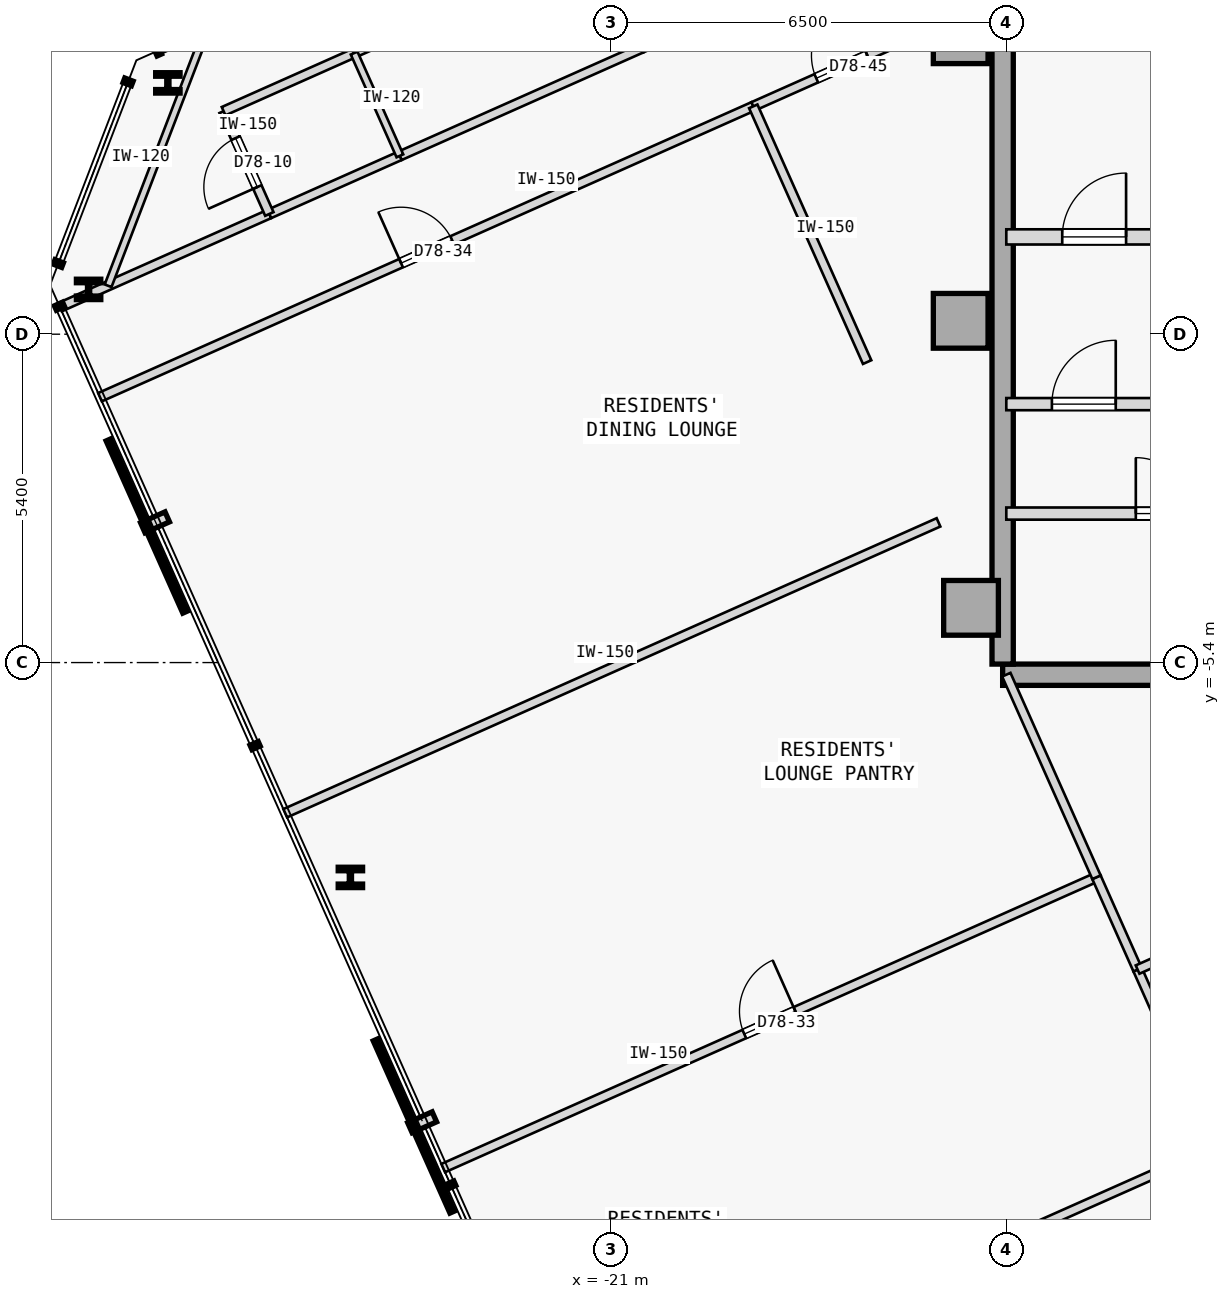
"""IFC4 building model, lengths in metres.
Left out: names, types, materials, properties, quantities, classifications, styles, units other than length and angle.
Written with IfcOpenShell. Run it as: python <this file> out.ifc"""

import sys

from ifc_helpers import new_model, si_unit, direction, frame, frame_2d, origin, origin_2d, place, context, subcontext, project, spatial, rectangle, i_section, extrude, element, fill, save


model = new_model("IFC4")
c1 = context("Model", 3, precision=1e-05, world=origin(), true_north=direction((0.0, 1.0)))
c2 = subcontext(c1, "Body", "Model", "MODEL_VIEW")
j1 = project(units=[si_unit("LENGTHUNIT", "METRE"), si_unit("PLANEANGLEUNIT", "RADIAN")], contexts=[c1])
p1 = place(None, origin())
s1 = spatial("IfcSite", under=j1, at=p1, CompositionType="ELEMENT")
p2 = place(p1, origin())
s2 = spatial("IfcBuilding", under=s1, at=p2, CompositionType="ELEMENT")
p3 = place(p2, frame((0.0, 0.0, 291.95)))
s3 = spatial("IfcBuildingStorey", under=s2, at=p3, CompositionType="ELEMENT", Elevation=291.95)
for number, where, z_axis, x_axis in (
    (1, (-15.25, 4.9, 0.0), (0.0, 0.0, 1.0), (1.0, 0.0, 0.0)),
    (2, (-15.25, 0.22, 0.0), (0.0, 0.0, 1.0), (1.0, 0.0, 0.0)),
    (3, (-15.08, -4.5, 0.0), (0.0, 0.0, 1.0), (1.0, 0.0, 0.0)),
):
    element("IfcColumn", number, at=place(p3, frame(where, z_axis=z_axis, x_axis=x_axis)), inside=s3, PredefinedType="COLUMN", context=c2, shape_type="SweptSolid", body=[
        extrude(rectangle(XDim=0.9, YDim=0.9, at=origin_2d()), origin(), (0.0, 0.0, 1.0), 3.35),
    ])
p4 = place(p3, frame((-14.56, -5.6, 0.0), z_axis=(0.0, 0.0, 1.0), x_axis=(1.0, 0.0, 0.0)))
e4 = element("IfcWall", 4, at=p4, inside=s3, PredefinedType="SHEAR", context=c2, shape_type="SweptSolid", body=[
    extrude(rectangle(XDim=10.86, YDim=0.35, at=frame_2d((5.43, 0.0))), origin(), (0.0, 0.0, 1.0), 3.125),
])
p5 = place(p3, frame((-14.56, -5.425, 0.0), z_axis=(0.0, 0.0, 1.0), x_axis=(0.0, 1.0, 0.0)))
e5 = element("IfcWall", 5, at=p5, inside=s3, PredefinedType="SHEAR", context=c2, shape_type="SweptSolid", body=[
    extrude(rectangle(XDim=10.85, YDim=0.35, at=frame_2d((5.425, 0.0))), origin(), (0.0, 0.0, 1.0), 3.125),
])
for number, where, z_axis, x_axis in (
    (6, (-28.288, 4.133, 0.0), (0.0, 0.0, 1.0), (1.0, 0.0, 0.0)),
    (7, (-29.592, 0.737, 0.0), (0.0, 0.0, 1.0), (1.0, 0.0, 0.0)),
    (8, (-25.286, -8.933, 0.0), (0.0, 0.0, 1.0), (1.0, 0.0, 0.0)),
):
    element("IfcColumn", number, at=place(p3, frame(where, z_axis=z_axis, x_axis=x_axis)), inside=s3, PredefinedType="COLUMN", context=c2, shape_type="SweptSolid", body=[
        extrude(i_section(OverallWidth=0.401, OverallDepth=0.335, WebThickness=0.036, FlangeThickness=0.058, FilletRadius=0.015, at=origin_2d()), origin(), (0.0, 0.0, 1.0), 3.35),
    ])
p6 = place(p3, frame((-14.5, 1.6, 0.0), z_axis=(0.0, 0.0, 1.0), x_axis=(1.0, 0.0, 0.0)))
e9 = element("IfcWall", 9, at=p6, inside=s3, PredefinedType="STANDARD", context=c2, shape_type="SweptSolid", body=[
    extrude(rectangle(XDim=3.6, YDim=0.25, at=frame_2d((1.8, 0.0))), origin(), (0.0, 0.0, 1.0), 3.125),
])
p7 = place(p6, frame((0.92, 0.0, 0.0)))
e10 = element("IfcOpeningElement", 10, at=p7, cuts=e9, PredefinedType="OPENING", context=c2, shape_type="SweptSolid", body=[
    extrude(rectangle(XDim=1.05, YDim=2.15, at=frame_2d((0.525, 1.075))), frame((0.0, 0.135, 0.0), z_axis=(0.0, -1.0, 0.0), x_axis=(1.0, 0.0, 0.0)), (0.0, 0.0, 1.0), 0.27),
])
p8 = place(p3, frame((-14.5, -1.15, 0.0), z_axis=(0.0, 0.0, 1.0), x_axis=(1.0, 0.0, 0.0)))
e11 = element("IfcWall", 11, at=p8, inside=s3, PredefinedType="STANDARD", context=c2, shape_type="SweptSolid", body=[
    extrude(rectangle(XDim=2.95, YDim=0.2, at=frame_2d((1.475, 0.0))), origin(), (0.0, 0.0, 1.0), 3.125),
])
p9 = place(p8, frame((0.75, 0.0, 0.0)))
e12 = element("IfcOpeningElement", 12, at=p9, cuts=e11, PredefinedType="OPENING", context=c2, shape_type="SweptSolid", body=[
    extrude(rectangle(XDim=1.05, YDim=2.18, at=frame_2d((0.525, 1.09))), frame((0.0, 0.11, 0.0), z_axis=(0.0, -1.0, 0.0), x_axis=(1.0, 0.0, 0.0)), (0.0, 0.0, 1.0), 0.22),
])
p10 = place(p3, frame((-14.5, -2.95, 0.0), z_axis=(0.0, 0.0, 1.0), x_axis=(1.0, 0.0, 0.0)))
e13 = element("IfcWall", 13, at=p10, inside=s3, PredefinedType="STANDARD", context=c2, shape_type="SweptSolid", body=[
    extrude(rectangle(XDim=10.8, YDim=0.2, at=frame_2d((5.4, 0.0))), origin(), (0.0, 0.0, 1.0), 3.125),
])
p11 = place(p10, frame((9.17, 0.0, 0.0)))
e14 = element("IfcOpeningElement", 14, at=p11, cuts=e13, PredefinedType="OPENING", context=c2, shape_type="SweptSolid", body=[
    extrude(rectangle(XDim=1.1, YDim=2.15, at=frame_2d((0.55, 1.075))), frame((0.0, 0.11, 0.0), z_axis=(0.0, -1.0, 0.0), x_axis=(1.0, 0.0, 0.0)), (0.0, 0.0, 1.0), 0.22),
])
p12 = place(p10, frame((2.13, 0.0, 0.0)))
e15 = element("IfcOpeningElement", 15, at=p12, cuts=e13, PredefinedType="OPENING", context=c2, shape_type="SweptSolid", body=[
    extrude(rectangle(XDim=0.92, YDim=2.15, at=frame_2d((0.46, 1.075))), frame((0.0, 0.11, 0.0), z_axis=(0.0, -1.0, 0.0), x_axis=(1.0, 0.0, 0.0)), (0.0, 0.0, 1.0), 0.22),
])
p13 = place(p10, frame((6.45, 0.0, 0.0)))
e16 = element("IfcOpeningElement", 16, at=p13, cuts=e13, PredefinedType="OPENING", context=c2, shape_type="SweptSolid", body=[
    extrude(rectangle(XDim=0.92, YDim=2.15, at=frame_2d((0.46, 1.075))), frame((0.0, 0.11, 0.0), z_axis=(0.0, -1.0, 0.0), x_axis=(1.0, 0.0, 0.0)), (0.0, 0.0, 1.0), 0.22),
])
p14 = place(p3, frame((-30.063, 0.444, 0.0), z_axis=(0.0, 0.0, 1.0), x_axis=(0.913541633228, 0.406745232743, 0.0)))
e17 = element("IfcWall", 17, at=p14, inside=s3, PredefinedType="PARTITIONING", context=c2, shape_type="SweptSolid", body=[
    extrude(rectangle(XDim=3.77, YDim=0.15, at=frame_2d((1.885, 0.0))), origin(), (0.0, 0.0, 1.0), 3.125),
])
p15 = place(p3, frame((-20.499, 4.702, 0.0), z_axis=(0.0, 0.0, 1.0), x_axis=(0.913553019012, 0.406719659537, 0.0)))
e18 = element("IfcWall", 18, at=p15, inside=s3, PredefinedType="PARTITIONING", context=c2, shape_type="SweptSolid", body=[
    extrude(rectangle(XDim=3.936, YDim=0.15, at=frame_2d((1.968, 0.0))), origin(), (0.0, 0.0, 1.0), 3.125),
])
p16 = place(p15, frame((1.493, 0.0, 0.0)))
e19 = element("IfcOpeningElement", 19, at=p16, cuts=e18, PredefinedType="OPENING", context=c2, shape_type="SweptSolid", body=[
    extrude(rectangle(XDim=0.95, YDim=2.15, at=frame_2d((0.475, 1.075))), frame((0.0, 0.085, 0.0), z_axis=(0.0, -1.0, 0.0), x_axis=(1.0, 0.0, 0.0)), (0.0, 0.0, 1.0), 0.17),
])
p17 = place(p3, frame((-26.619, 1.977, 0.0), z_axis=(0.0, 0.0, 1.0), x_axis=(0.913541436194, 0.406745675276, 0.0)))
e20 = element("IfcWall", 20, at=p17, inside=s3, PredefinedType="PARTITIONING", context=c2, shape_type="SweptSolid", body=[
    extrude(rectangle(XDim=2.35, YDim=0.15, at=frame_2d((1.175, 0.0))), origin(), (0.0, 0.0, 1.0), 3.125),
])
p18 = place(p3, frame((-24.472, 2.933, 0.0), z_axis=(0.0, 0.0, 1.0), x_axis=(0.913545193015, 0.406737237438, 0.0)))
e21 = element("IfcWall", 21, at=p18, inside=s3, PredefinedType="PARTITIONING", context=c2, shape_type="SweptSolid", body=[
    extrude(rectangle(XDim=4.35, YDim=0.15, at=frame_2d((2.175, 0.0))), origin(), (0.0, 0.0, 1.0), 3.125),
])
p19 = place(p3, frame((-29.404, -1.036, 0.0), z_axis=(0.0, 0.0, 1.0), x_axis=(0.913544247064, 0.406739362069, 0.0)))
e22 = element("IfcWall", 22, at=p19, inside=s3, PredefinedType="PARTITIONING", context=c2, shape_type="SweptSolid", body=[
    extrude(rectangle(XDim=11.76, YDim=0.15, at=frame_2d((5.88, 0.0))), origin(), (0.0, 0.0, 1.0), 3.125),
])
p20 = place(p19, frame((5.42, 0.0, 0.0)))
e23 = element("IfcOpeningElement", 23, at=p20, cuts=e22, PredefinedType="OPENING", context=c2, shape_type="SweptSolid", body=[
    extrude(rectangle(XDim=0.92, YDim=2.15, at=frame_2d((0.46, 1.075))), frame((0.0, 0.085, 0.0), z_axis=(0.0, -1.0, 0.0), x_axis=(1.0, 0.0, 0.0)), (0.0, 0.0, 1.0), 0.17),
])
p21 = place(p3, frame((-18.661, 3.747, 0.0), z_axis=(0.0, 0.0, 1.0), x_axis=(0.913535055583, 0.40676000568, 0.0)))
e24 = element("IfcWall", 24, at=p21, inside=s3, PredefinedType="PARTITIONING", context=c2, shape_type="SweptSolid", body=[
    extrude(rectangle(XDim=4.555, YDim=0.15, at=frame_2d((2.277, 0.0))), origin(), (0.0, 0.0, 1.0), 3.125),
])
p22 = place(p21, frame((1.134, 0.0, 0.0)))
e25 = element("IfcOpeningElement", 25, at=p22, cuts=e24, PredefinedType="OPENING", context=c2, shape_type="SweptSolid", body=[
    extrude(rectangle(XDim=0.92, YDim=2.15, at=frame_2d((0.46, 1.075))), frame((0.0, 0.085, 0.0), z_axis=(0.0, -1.0, 0.0), x_axis=(1.0, 0.0, 0.0)), (0.0, 0.0, 1.0), 0.17),
])
p23 = place(p3, frame((-26.619, 1.977, 0.0), z_axis=(0.0, 0.0, 1.0), x_axis=(-0.406750635596, 0.913539227643, 0.0)))
e26 = element("IfcWall", 26, at=p23, inside=s3, PredefinedType="PARTITIONING", context=c2, shape_type="SweptSolid", body=[
    extrude(rectangle(XDim=1.85, YDim=0.15, at=frame_2d((0.925, 0.0))), origin(), (0.0, 0.0, 1.0), 3.125),
])
p24 = place(p23, frame((0.485, 0.0, 0.0)))
e27 = element("IfcOpeningElement", 27, at=p24, cuts=e26, PredefinedType="OPENING", context=c2, shape_type="SweptSolid", body=[
    extrude(rectangle(XDim=0.88, YDim=2.15, at=frame_2d((0.44, 1.075))), frame((0.0, 0.085, 0.0), z_axis=(0.0, -1.0, 0.0), x_axis=(1.0, 0.0, 0.0)), (0.0, 0.0, 1.0), 0.17),
])
p25 = place(p3, frame((-27.372, 3.667, 0.0), z_axis=(0.0, 0.0, 1.0), x_axis=(0.913541436194, 0.406745675276, 0.0)))
e28 = element("IfcWall", 28, at=p25, inside=s3, PredefinedType="PARTITIONING", context=c2, shape_type="SweptSolid", body=[
    extrude(rectangle(XDim=2.35, YDim=0.15, at=frame_2d((1.175, 0.0))), origin(), (0.0, 0.0, 1.0), 3.125),
])
p26 = place(p3, frame((-25.225, 4.623, 0.0), z_axis=(0.0, 0.0, 1.0), x_axis=(0.913545193015, 0.406737237438, 0.0)))
e29 = element("IfcWall", 29, at=p26, inside=s3, PredefinedType="PARTITIONING", context=c2, shape_type="SweptSolid", body=[
    extrude(rectangle(XDim=4.35, YDim=0.15, at=frame_2d((2.175, 0.0))), origin(), (0.0, 0.0, 1.0), 3.125),
])
p27 = place(p3, frame((-24.472, 2.933, 0.0), z_axis=(0.0, 0.0, 1.0), x_axis=(-0.406750635596, 0.913539227643, 0.0)))
e30 = element("IfcWall", 30, at=p27, inside=s3, PredefinedType="PARTITIONING", context=c2, shape_type="SweptSolid", body=[
    extrude(rectangle(XDim=1.85, YDim=0.12, at=frame_2d((0.925, 0.0))), origin(), (0.0, 0.0, 1.0), 3.125),
])
p28 = place(p3, frame((-21.789, -18.14, 0.0), z_axis=(0.0, 0.0, 1.0), x_axis=(0.913544247064, 0.406739362069, 0.0)))
e31 = element("IfcWall", 31, at=p28, inside=s3, PredefinedType="PARTITIONING", context=c2, shape_type="SweptSolid", body=[
    extrude(rectangle(XDim=11.76, YDim=0.15, at=frame_2d((5.88, 0.0))), origin(), (0.0, 0.0, 1.0), 3.125),
])
p29 = place(p28, frame((5.42, 0.0, 0.0)))
e32 = element("IfcOpeningElement", 32, at=p29, cuts=e31, PredefinedType="OPENING", context=c2, shape_type="SweptSolid", body=[
    extrude(rectangle(XDim=0.92, YDim=2.15, at=frame_2d((0.46, 1.075))), frame((0.0, 0.085, 0.0), z_axis=(0.0, -1.0, 0.0), x_axis=(1.0, 0.0, 0.0)), (0.0, 0.0, 1.0), 0.17),
])
p30 = place(p3, frame((-23.76, -13.713, 0.0), z_axis=(0.0, 0.0, 1.0), x_axis=(0.913544247064, 0.406739362069, 0.0)))
e33 = element("IfcWall", 33, at=p30, inside=s3, PredefinedType="PARTITIONING", context=c2, shape_type="SweptSolid", body=[
    extrude(rectangle(XDim=11.76, YDim=0.15, at=frame_2d((5.88, 0.0))), origin(), (0.0, 0.0, 1.0), 3.125),
])
p31 = place(p30, frame((5.42, 0.0, 0.0)))
e34 = element("IfcOpeningElement", 34, at=p31, cuts=e33, PredefinedType="OPENING", context=c2, shape_type="SweptSolid", body=[
    extrude(rectangle(XDim=0.92, YDim=2.15, at=frame_2d((0.46, 1.075))), frame((0.0, 0.085, 0.0), z_axis=(0.0, -1.0, 0.0), x_axis=(1.0, 0.0, 0.0)), (0.0, 0.0, 1.0), 0.17),
])
p32 = place(p3, frame((-11.046, -13.357, 0.0), z_axis=(0.0, 0.0, 1.0), x_axis=(-0.406707553978, 0.913558408388, 0.0)))
e35 = element("IfcWall", 35, at=p32, inside=s3, PredefinedType="PARTITIONING", context=c2, shape_type="SweptSolid", body=[
    extrude(rectangle(XDim=3.184, YDim=0.15, at=frame_2d((1.592, 0.0))), origin(), (0.0, 0.0, 1.0), 3.125),
])
p33 = place(p3, frame((-12.341, -10.448, 0.0), z_axis=(0.0, 0.0, 1.0), x_axis=(-0.406751698222, 0.913538754511, 0.0)))
e36 = element("IfcWall", 36, at=p33, inside=s3, PredefinedType="PARTITIONING", context=c2, shape_type="SweptSolid", body=[
    extrude(rectangle(XDim=1.662, YDim=0.15, at=frame_2d((0.831, 0.0))), origin(), (0.0, 0.0, 1.0), 3.125),
])
p34 = place(p3, frame((-26.358, -7.878, 0.0), z_axis=(0.0, 0.0, 1.0), x_axis=(0.913547681516, 0.406731648137, 0.0)))
e37 = element("IfcWall", 37, at=p34, inside=s3, PredefinedType="PARTITIONING", context=c2, shape_type="SweptSolid", body=[
    extrude(rectangle(XDim=11.76, YDim=0.15, at=frame_2d((5.88, 0.0))), origin(), (0.0, 0.0, 1.0), 3.125),
])
p35 = place(p3, frame((-13.017, -8.93, 0.0), z_axis=(0.0, 0.0, 1.0), x_axis=(-0.406722395322, 0.913551801018, 0.0)))
e38 = element("IfcWall", 38, at=p35, inside=s3, PredefinedType="PARTITIONING", context=c2, shape_type="SweptSolid", body=[
    extrude(rectangle(XDim=3.646, YDim=0.15, at=frame_2d((1.823, 0.0))), origin(), (0.0, 0.0, 1.0), 3.125),
])
p36 = place(p3, frame((-16.789, -0.459, 0.0), z_axis=(0.0, 0.0, 1.0), x_axis=(-0.406738654026, 0.913544562307, 0.0)))
e39 = element("IfcWall", 39, at=p36, inside=s3, PredefinedType="PARTITIONING", context=c2, shape_type="SweptSolid", body=[
    extrude(rectangle(XDim=4.604, YDim=0.15, at=frame_2d((2.302, 0.0))), origin(), (0.0, 0.0, 1.0), 3.125),
])
p37 = place(p3, frame((-12.341, -10.448, 0.0), z_axis=(0.0, 0.0, 1.0), x_axis=(0.913539934271, 0.406749048544, 0.0)))
e40 = element("IfcWall", 40, at=p37, inside=s3, PredefinedType="PARTITIONING", context=c2, shape_type="SweptSolid", body=[
    extrude(rectangle(XDim=9.459, YDim=0.15, at=frame_2d((4.729, 0.0))), origin(), (0.0, 0.0, 1.0), 3.125),
])
p38 = place(p37, frame((4.27, 0.0, 0.0)))
e41 = element("IfcOpeningElement", 41, at=p38, cuts=e40, PredefinedType="OPENING", context=c2, shape_type="SweptSolid", body=[
    extrude(rectangle(XDim=0.92, YDim=2.15, at=frame_2d((0.46, 1.075))), frame((0.0, 0.085, 0.0), z_axis=(0.0, -1.0, 0.0), x_axis=(1.0, 0.0, 0.0)), (0.0, 0.0, 1.0), 0.17),
])
p39 = place(p3, frame((-29.271, 0.797, 0.0), z_axis=(0.0, 0.0, 1.0), x_axis=(0.358310046253, 0.933602651428, 0.0)))
e42 = element("IfcWall", 42, at=p39, inside=s3, PredefinedType="PARTITIONING", context=c2, shape_type="SweptSolid", body=[
    extrude(rectangle(XDim=4.353, YDim=0.12, at=frame_2d((2.177, 0.0))), origin(), (0.0, 0.0, 1.0), 3.125),
])
p40 = place(p7, origin())
e43 = element("IfcDoor", 43, at=p40, inside=s3, OperationType="SINGLE_SWING_RIGHT", PredefinedType="DOOR", context=c2, shape_type="SweptSolid", body=[
    extrude(rectangle(XDim=1.05, YDim=2.15, at=frame_2d((0.525, 1.075))), frame((0.0, 0.025, 0.0), z_axis=(0.0, -1.0, 0.0), x_axis=(1.0, 0.0, 0.0)), (0.0, 0.0, 1.0), 0.05),
])
fill(e10, e43)
p41 = place(p9, origin())
e44 = element("IfcDoor", 44, at=p41, inside=s3, OperationType="SINGLE_SWING_RIGHT", PredefinedType="DOOR", context=c2, shape_type="SweptSolid", body=[
    extrude(rectangle(XDim=1.05, YDim=2.18, at=frame_2d((0.525, 1.09))), frame((0.0, 0.025, 0.0), z_axis=(0.0, -1.0, 0.0), x_axis=(1.0, 0.0, 0.0)), (0.0, 0.0, 1.0), 0.05),
])
fill(e12, e44)
p42 = place(p12, origin())
e45 = element("IfcDoor", 45, at=p42, inside=s3, OperationType="SINGLE_SWING_LEFT", PredefinedType="DOOR", context=c2, shape_type="SweptSolid", body=[
    extrude(rectangle(XDim=0.92, YDim=2.15, at=frame_2d((0.46, 1.075))), frame((0.0, 0.025, 0.0), z_axis=(0.0, -1.0, 0.0), x_axis=(1.0, 0.0, 0.0)), (0.0, 0.0, 1.0), 0.05),
])
fill(e15, e45)
p43 = place(p24, origin())
e46 = element("IfcDoor", 46, at=p43, inside=s3, OperationType="SINGLE_SWING_LEFT", PredefinedType="DOOR", context=c2, shape_type="SweptSolid", body=[
    extrude(rectangle(XDim=0.88, YDim=2.15, at=frame_2d((0.44, 1.075))), frame((0.0, 0.025, 0.0), z_axis=(0.0, -1.0, 0.0), x_axis=(1.0, 0.0, 0.0)), (0.0, 0.0, 1.0), 0.05),
])
fill(e27, e46)
p44 = place(p31, origin())
e47 = element("IfcDoor", 47, at=p44, inside=s3, OperationType="SINGLE_SWING_RIGHT", PredefinedType="DOOR", context=c2, shape_type="SweptSolid", body=[
    extrude(rectangle(XDim=0.92, YDim=2.15, at=frame_2d((0.46, 1.075))), frame((0.0, 0.025, 0.0), z_axis=(0.0, -1.0, 0.0), x_axis=(1.0, 0.0, 0.0)), (0.0, 0.0, 1.0), 0.05),
])
fill(e34, e47)
p45 = place(p20, origin())
e48 = element("IfcDoor", 48, at=p45, inside=s3, OperationType="SINGLE_SWING_LEFT", PredefinedType="DOOR", context=c2, shape_type="SweptSolid", body=[
    extrude(rectangle(XDim=0.92, YDim=2.15, at=frame_2d((0.46, 1.075))), frame((0.0, 0.025, 0.0), z_axis=(0.0, -1.0, 0.0), x_axis=(1.0, 0.0, 0.0)), (0.0, 0.0, 1.0), 0.05),
])
fill(e23, e48)
p46 = place(p22, origin())
e49 = element("IfcDoor", 49, at=p46, inside=s3, OperationType="SINGLE_SWING_RIGHT", PredefinedType="DOOR", context=c2, shape_type="SweptSolid", body=[
    extrude(rectangle(XDim=0.92, YDim=2.15, at=frame_2d((0.46, 1.075))), frame((0.0, 0.025, 0.0), z_axis=(0.0, -1.0, 0.0), x_axis=(1.0, 0.0, 0.0)), (0.0, 0.0, 1.0), 0.05),
])
fill(e25, e49)
save(model, sys.argv[1])
